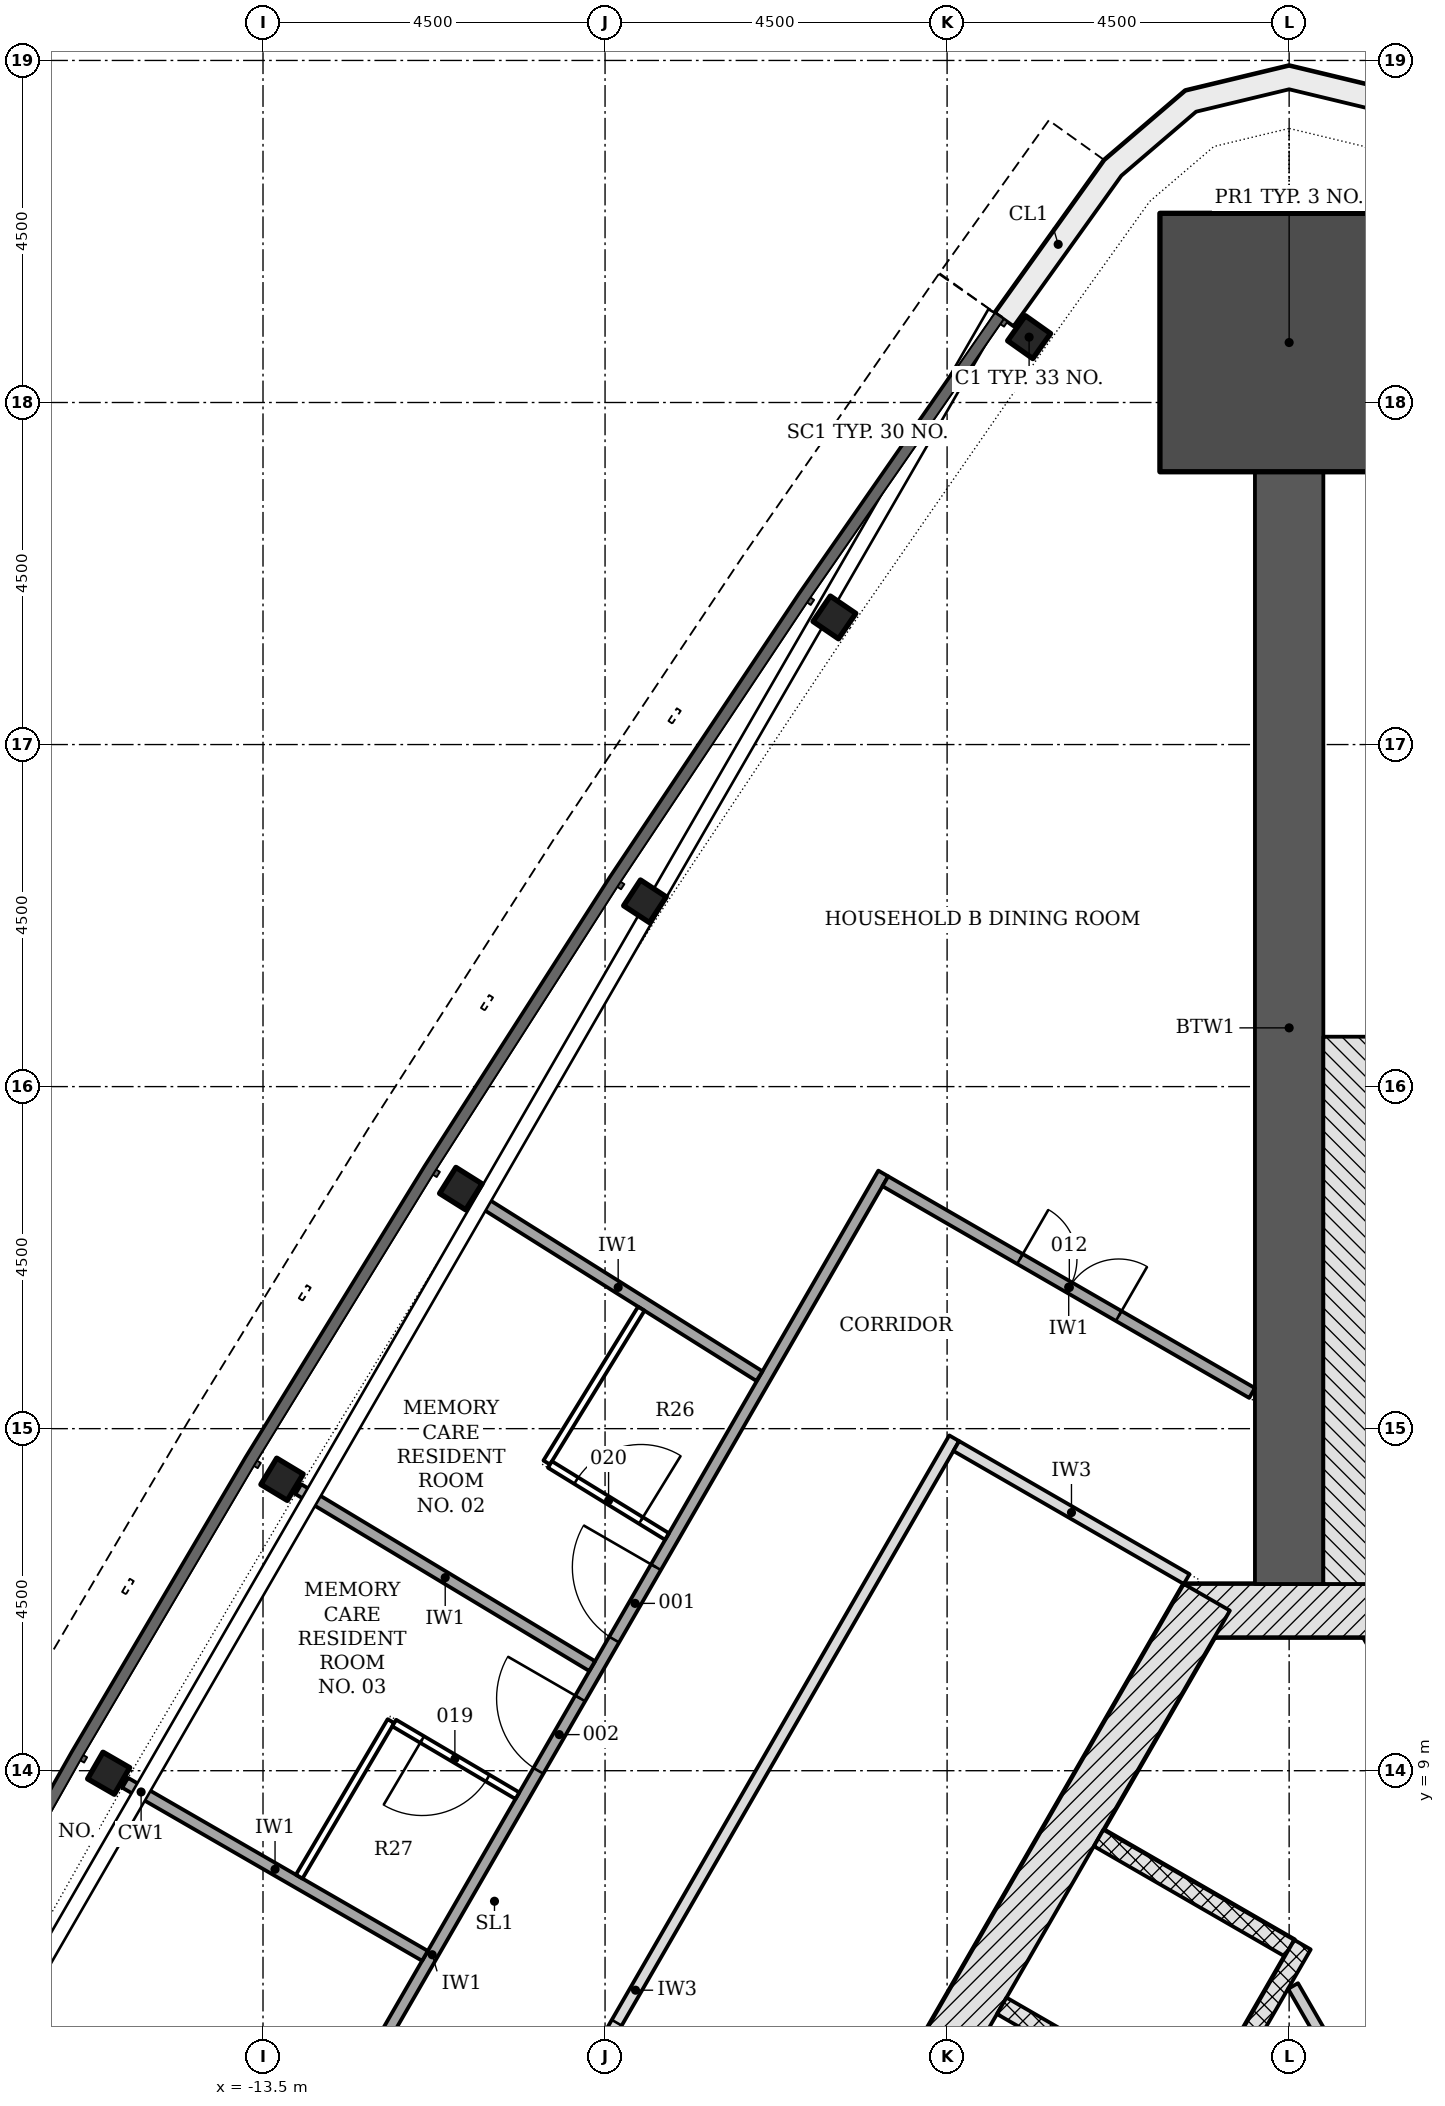
"""IFC4 building model, lengths in metres.
Left out: names, types, materials, properties, quantities, classifications, styles, units other than length and angle.
Written with IfcOpenShell. Run it as: python <this file> out.ifc"""

import sys

from ifc_helpers import new_model, si_unit, direction, frame, frame_2d, origin, origin_2d, place, context, subcontext, project, spatial, polyline, rectangle, i_section, outline, extrude, element, fill, save


model = new_model("IFC4")
c1 = context("Model", 3, precision=1e-05, world=origin(), true_north=direction((0.0, 1.0)))
c2 = subcontext(c1, "Body", "Model", "MODEL_VIEW")
j1 = project(units=[si_unit("LENGTHUNIT", "METRE"), si_unit("PLANEANGLEUNIT", "RADIAN")], contexts=[c1])
p1 = place(None, origin())
s1 = spatial("IfcSite", under=j1, at=p1, CompositionType="ELEMENT")
p2 = place(p1, origin())
s2 = spatial("IfcBuilding", under=s1, at=p2, CompositionType="ELEMENT")
p3 = place(p2, frame((0.0, 0.0, 27.6)))
s3 = spatial("IfcBuildingStorey", under=s2, at=p3, CompositionType="ELEMENT", Elevation=27.6)
p4 = place(p3, frame((10.311, -4.703, -0.2), z_axis=(0.0, 0.0, 1.0), x_axis=(-0.500001446645, 0.866024568562, 0.0)))
e1 = element("IfcWall", 1, at=p4, inside=s3, PredefinedType="SHEAR", context=c2, shape_type="SweptSolid", body=[
    extrude(rectangle(XDim=18.458, YDim=0.7, at=frame_2d((9.229, 0.0))), origin(), (0.0, 0.0, 1.0), 3.6),
])
p5 = place(p4, frame((8.7, 0.0, 0.2)))
e2 = element("IfcOpeningElement", 2, at=p5, cuts=e1, PredefinedType="OPENING", context=c2, shape_type="SweptSolid", body=[
    extrude(rectangle(XDim=1.0, YDim=2.1, at=frame_2d((0.5, 1.05))), frame((0.0, 0.36, 0.0), z_axis=(0.0, -1.0, 0.0), x_axis=(1.0, 0.0, 0.0)), (0.0, 0.0, 1.0), 0.72),
])
p6 = place(p4, frame((3.99, 0.0, 0.2)))
e3 = element("IfcOpeningElement", 3, at=p6, cuts=e1, PredefinedType="OPENING", context=c2, shape_type="SweptSolid", body=[
    extrude(rectangle(XDim=0.9, YDim=2.1, at=frame_2d((0.45, 1.05))), frame((0.0, 0.36, 0.0), z_axis=(0.0, -1.0, 0.0), x_axis=(1.0, 0.0, 0.0)), (0.0, 0.0, 1.0), 0.72),
])
p7 = place(p4, frame((13.539, 0.0, 0.2)))
e4 = element("IfcOpeningElement", 4, at=p7, cuts=e1, PredefinedType="OPENING", context=c2, shape_type="SweptSolid", body=[
    extrude(rectangle(XDim=0.9, YDim=2.1, at=frame_2d((0.45, 1.05))), frame((0.0, 0.36, 0.0), z_axis=(0.0, -1.0, 0.0), x_axis=(1.0, 0.0, 0.0)), (0.0, 0.0, 1.0), 0.72),
])
p8 = place(p3, frame((1.386, 11.106, -0.2), z_axis=(0.0, 0.0, 1.0), x_axis=(-1.0, 0.0, 0.0)))
e5 = element("IfcWall", 5, at=p8, inside=s3, PredefinedType="SHEAR", context=c2, shape_type="SweptSolid", body=[
    extrude(rectangle(XDim=2.771, YDim=0.7, at=frame_2d((1.386, 0.0))), origin(), (0.0, 0.0, 1.0), 3.6),
])
p9 = place(p3, frame((-1.083, 11.281, -0.2), z_axis=(0.0, 0.0, 1.0), x_axis=(-0.500001446645, -0.866024568562, 0.0)))
e6 = element("IfcWall", 6, at=p9, inside=s3, PredefinedType="SHEAR", context=c2, shape_type="SweptSolid", body=[
    extrude(rectangle(XDim=18.458, YDim=0.7, at=frame_2d((9.229, 0.0))), origin(), (0.0, 0.0, 1.0), 3.6),
])
p10 = place(p9, frame((8.979, 0.0, 0.2)))
e7 = element("IfcOpeningElement", 7, at=p10, cuts=e6, PredefinedType="OPENING", context=c2, shape_type="SweptSolid", body=[
    extrude(rectangle(XDim=1.2, YDim=2.1, at=frame_2d((0.6, 1.05))), frame((0.0, 0.36, 0.0), z_axis=(0.0, -1.0, 0.0), x_axis=(1.0, 0.0, 0.0)), (0.0, 0.0, 1.0), 0.72),
])
p11 = place(p9, frame((11.029, 0.0, 0.2)))
e8 = element("IfcOpeningElement", 8, at=p11, cuts=e6, PredefinedType="OPENING", context=c2, shape_type="SweptSolid", body=[
    extrude(rectangle(XDim=1.2, YDim=2.1, at=frame_2d((0.6, 1.05))), frame((0.0, 0.36, 0.0), z_axis=(0.0, -1.0, 0.0), x_axis=(1.0, 0.0, 0.0)), (0.0, 0.0, 1.0), 0.72),
])
p12 = place(p3, frame((0.0, 11.456, -0.2), z_axis=(0.0, 0.0, 1.0), x_axis=(0.0, 1.0, 0.0)))
e9 = element("IfcWall", 9, at=p12, inside=s3, PredefinedType="SHEAR", context=c2, shape_type="SweptSolid", body=[
    extrude(rectangle(XDim=14.633, YDim=0.9, at=frame_2d((7.316, 0.0))), origin(), (0.0, 0.0, 1.0), 3.6),
])
p13 = place(p3, frame((0.0, 27.789, -0.2), z_axis=(0.0, 0.0, 1.0), x_axis=(0.0, 1.0, 0.0)))
e10 = element("IfcColumn", 10, at=p13, inside=s3, PredefinedType="COLUMN", context=c2, shape_type="SweptSolid", body=[
    extrude(rectangle(XDim=3.4, YDim=3.4, at=origin_2d()), origin(), (0.0, 0.0, 1.0), 3.6),
])
for number, where, z_axis, x_axis in (
    (11, (-3.421, 27.86, -0.2), (0.0, 0.0, 1.0), (-0.578, -0.816, 0.0)),
    (12, (-5.982, 24.172, -0.2), (0.0, 0.0, 1.0), (-0.563, -0.827, 0.0)),
    (13, (-8.475, 20.438, -0.2), (0.0, 0.0, 1.0), (-0.547, -0.837, 0.0)),
    (14, (-10.897, 16.658, -0.2), (0.0, 0.0, 1.0), (-0.532, -0.847, 0.0)),
    (15, (-13.25, 12.834, -0.2), (0.0, 0.0, 1.0), (-0.516, -0.857, 0.0)),
    (16, (-15.531, 8.967, -0.2), (0.0, 0.0, 1.0), (-0.5, -0.866, 0.0)),
):
    element("IfcColumn", number, at=place(p3, frame(where, z_axis=z_axis, x_axis=x_axis)), inside=s3, PredefinedType="COLUMN", context=c2, shape_type="SweptSolid", body=[
        extrude(i_section(OverallWidth=0.404, OverallDepth=0.406, WebThickness=0.027, FlangeThickness=0.044, FilletRadius=0.015, at=origin_2d()), origin(), (0.0, 0.0, 1.0), 3.6),
    ])
p14 = place(p3, origin())
e17 = element("IfcWall", 17, at=p14, inside=s3, PredefinedType="NOTDEFINED", context=c2, shape_type="SweptSolid", body=[
    extrude(outline(polyline([(3.87, 28.178), (2.43, 30.188), (1.364, 31.101), (0.0, 31.429), (-1.364, 31.101), (-2.43, 30.188), (-3.87, 28.178), (-3.626, 28.003), (-2.208, 29.984), (-1.224, 30.826), (0.0, 31.121), (1.224, 30.826), (2.208, 29.984), (3.626, 28.003), (3.87, 28.178)])), origin(), (0.0, 0.0, 1.0), 3.3),
])
p15 = place(p3, frame((-2.506, 8.115, -0.2), z_axis=(0.0, 0.0, 1.0), x_axis=(0.865996321171, -0.50005036918, 0.0)))
e18 = element("IfcWall", 18, at=p15, inside=s3, PredefinedType="PARTITIONING", context=c2, shape_type="SweptSolid", body=[
    extrude(rectangle(XDim=2.9, YDim=0.25, at=frame_2d((1.45, 0.0))), origin(), (0.0, 0.0, 1.0), 3.6),
])
p16 = place(p3, frame((-3.781, 5.907, -0.2), z_axis=(0.0, 0.0, 1.0), x_axis=(0.866032775405, -0.499987231761, 0.0)))
e19 = element("IfcWall", 19, at=p16, inside=s3, PredefinedType="PARTITIONING", context=c2, shape_type="SweptSolid", body=[
    extrude(rectangle(XDim=2.9, YDim=0.25, at=frame_2d((1.45, 0.0))), origin(), (0.0, 0.0, 1.0), 3.6),
])
p17 = place(p3, frame((0.176, 6.711, 0.0), z_axis=(0.0, 0.0, 1.0), x_axis=(-0.500004227369, -0.866022963098, 0.0)))
e20 = element("IfcWall", 20, at=p17, inside=s3, PredefinedType="PARTITIONING", context=c2, shape_type="SweptSolid", body=[
    extrude(rectangle(XDim=11.8, YDim=0.25, at=frame_2d((5.9, 0.0))), origin(), (0.0, 0.0, 1.0), 3.4),
])
p18 = place(p3, frame((2.174, 2.492, 0.0), z_axis=(0.0, 0.0, 1.0), x_axis=(-0.499999641798, 0.866025610592, 0.0)))
e21 = element("IfcWall", 21, at=p18, inside=s3, PredefinedType="PARTITIONING", context=c2, shape_type="SweptSolid", body=[
    extrude(rectangle(XDim=4.244, YDim=0.15, at=frame_2d((2.122, 0.0))), origin(), (0.0, 0.0, 1.0), 3.4),
])
p19 = place(p3, frame((1.018, 11.456, -0.2), z_axis=(0.0, 0.0, 1.0), x_axis=(0.0, 1.0, 0.0)))
e22 = element("IfcWall", 22, at=p19, inside=s3, PredefinedType="SHEAR", context=c2, shape_type="SweptSolid", body=[
    extrude(rectangle(XDim=7.2, YDim=1.136, at=frame_2d((3.6, 0.0))), origin(), (0.0, 0.0, 1.0), 3.6),
])
p20 = place(p3, frame((-17.208, -3.699, 0.0), z_axis=(0.0, 0.0, 1.0), x_axis=(0.499997567621, 0.866026808115, 0.0)))
e23 = element("IfcWall", 23, at=p20, inside=s3, PredefinedType="PARTITIONING", context=c2, shape_type="SweptSolid", body=[
    extrude(rectangle(XDim=23.736, YDim=0.15, at=frame_2d((11.868, 0.0))), origin(), (0.0, 0.0, 1.0), 2.768),
])
p21 = place(p20, frame((16.656, 0.0, 0.0)))
e24 = element("IfcOpeningElement", 24, at=p21, cuts=e23, PredefinedType="OPENING", context=c2, shape_type="SweptSolid", body=[
    extrude(rectangle(XDim=1.1, YDim=2.1, at=frame_2d((0.55, 1.05))), frame((0.0, 0.085, 0.0), z_axis=(0.0, -1.0, 0.0), x_axis=(1.0, 0.0, 0.0)), (0.0, 0.0, 1.0), 0.17),
])
p22 = place(p20, frame((14.662, 0.0, 0.0)))
e25 = element("IfcOpeningElement", 25, at=p22, cuts=e23, PredefinedType="OPENING", context=c2, shape_type="SweptSolid", body=[
    extrude(rectangle(XDim=1.1, YDim=2.1, at=frame_2d((0.55, 1.05))), frame((0.0, 0.085, 0.0), z_axis=(0.0, -1.0, 0.0), x_axis=(1.0, 0.0, 0.0)), (0.0, 0.0, 1.0), 0.17),
])
p23 = place(p20, frame((5.273, 0.0, 0.0)))
e26 = element("IfcOpeningElement", 26, at=p23, cuts=e23, PredefinedType="OPENING", context=c2, shape_type="SweptSolid", body=[
    extrude(rectangle(XDim=1.0, YDim=2.1, at=frame_2d((0.5, 1.05))), frame((0.0, 0.085, 0.0), z_axis=(0.0, -1.0, 0.0), x_axis=(1.0, 0.0, 0.0)), (0.0, 0.0, 1.0), 0.17),
])
p24 = place(p3, frame((-4.407, 13.374, 0.0), z_axis=(0.0, 0.0, 1.0), x_axis=(-0.499997181693, -0.866027030928, 0.0)))
e27 = element("IfcWall", 27, at=p24, inside=s3, PredefinedType="PARTITIONING", context=c2, shape_type="SweptSolid", body=[
    extrude(rectangle(XDim=16.77, YDim=0.15, at=frame_2d((8.385, 0.0))), origin(), (0.0, 0.0, 1.0), 2.768),
])
p25 = place(p24, frame((8.879, 0.0, 0.0)))
e28 = element("IfcOpeningElement", 28, at=p25, cuts=e27, PredefinedType="OPENING", context=c2, shape_type="SweptSolid", body=[
    extrude(rectangle(XDim=1.0, YDim=2.1, at=frame_2d((0.5, 1.05))), frame((0.0, 0.085, 0.0), z_axis=(0.0, -1.0, 0.0), x_axis=(1.0, 0.0, 0.0)), (0.0, 0.0, 1.0), 0.17),
])
p26 = place(p3, frame((-5.312, 16.755, 0.0), z_axis=(0.0, 0.0, 1.0), x_axis=(0.866028693448, -0.499994302092, 0.0)))
e29 = element("IfcWall", 29, at=p26, inside=s3, PredefinedType="PARTITIONING", context=c2, shape_type="SweptSolid", body=[
    extrude(rectangle(XDim=5.571, YDim=0.15, at=frame_2d((2.786, 0.0))), origin(), (0.0, 0.0, 1.0), 3.4),
])
p27 = place(p26, frame((2.045, 0.0, 0.0)))
e30 = element("IfcOpeningElement", 30, at=p27, cuts=e29, PredefinedType="OPENING", context=c2, shape_type="SweptSolid", body=[
    extrude(rectangle(XDim=1.5, YDim=2.1, at=frame_2d((0.75, 1.05))), frame((0.0, 0.085, 0.0), z_axis=(0.0, -1.0, 0.0), x_axis=(1.0, 0.0, 0.0)), (0.0, 0.0, 1.0), 0.17),
])
p28 = place(p3, frame((-4.379, 13.271, 0.0), z_axis=(0.0, 0.0, 1.0), x_axis=(0.866019471182, -0.500010275428, 0.0)))
e31 = element("IfcWall", 31, at=p28, inside=s3, PredefinedType="PARTITIONING", context=c2, shape_type="SweptSolid", body=[
    extrude(rectangle(XDim=3.5, YDim=0.15, at=frame_2d((1.75, 0.0))), origin(), (0.0, 0.0, 1.0), 3.4),
])
p29 = place(p3, frame((-15.314, 8.842, 0.0), z_axis=(0.0, 0.0, 1.0), x_axis=(0.866031166731, -0.499990018151, 0.0)))
e32 = element("IfcWall", 32, at=p29, inside=s3, PredefinedType="PARTITIONING", context=c2, shape_type="SweptSolid", body=[
    extrude(rectangle(XDim=4.555, YDim=0.15, at=frame_2d((2.277, 0.0))), origin(), (0.0, 0.0, 1.0), 2.768),
])
p30 = place(p3, frame((-13.036, 12.705, 0.0), z_axis=(0.0, 0.0, 1.0), x_axis=(0.856594224171, -0.515990634719, 0.0)))
e33 = element("IfcWall", 33, at=p30, inside=s3, PredefinedType="PARTITIONING", context=c2, shape_type="SweptSolid", body=[
    extrude(rectangle(XDim=4.513, YDim=0.15, at=frame_2d((2.256, 0.0))), origin(), (0.0, 0.0, 1.0), 2.768),
])
p31 = place(p3, frame((-10.686, 16.525, 0.0), z_axis=(0.0, 0.0, 1.0), x_axis=(0.846871345174, -0.531797823165, 0.0)))
e34 = element("IfcWall", 34, at=p31, inside=s3, PredefinedType="PARTITIONING", context=c2, shape_type="SweptSolid", body=[
    extrude(rectangle(XDim=4.389, YDim=0.15, at=frame_2d((2.194, 0.0))), origin(), (0.0, 0.0, 1.0), 2.768),
])
for number, where, z_axis, x_axis in (
    (35, (-8.523, 15.078, 0.0), (0.0, 0.0, 1.0), (-0.524, -0.852, 0.0)),
    (36, (-13.024, 7.606, 0.0), (0.0, 0.0, 1.0), (0.508, 0.861, 0.0)),
):
    element("IfcWall", number, at=place(p3, frame(where, z_axis=z_axis, x_axis=x_axis)), inside=s3, PredefinedType="PARTITIONING", context=c2, shape_type="SweptSolid", body=[
        extrude(rectangle(XDim=2.375, YDim=0.1, at=frame_2d((1.188, 0.0))), origin(), (0.0, 0.0, 1.0), 2.768),
    ])
p32 = place(p3, frame((-10.153, 8.671, 0.0), z_axis=(0.0, 0.0, 1.0), x_axis=(-0.861326599867, 0.508051659147, 0.0)))
e37 = element("IfcWall", 37, at=p32, inside=s3, PredefinedType="PARTITIONING", context=c2, shape_type="SweptSolid", body=[
    extrude(rectangle(XDim=1.882, YDim=0.1, at=frame_2d((0.941, 0.0))), origin(), (0.0, 0.0, 1.0), 3.4),
])
p33 = place(p32, frame((0.455, 0.0, 0.0)))
e38 = element("IfcOpeningElement", 38, at=p33, cuts=e37, PredefinedType="OPENING", context=c2, shape_type="SweptSolid", body=[
    extrude(rectangle(XDim=1.0, YDim=2.1, at=frame_2d((0.5, 1.05))), frame((0.0, 0.06, 0.0), z_axis=(0.0, -1.0, 0.0), x_axis=(1.0, 0.0, 0.0)), (0.0, 0.0, 1.0), 0.12),
])
p34 = place(p3, frame((-9.725, 13.029, 0.0), z_axis=(0.0, 0.0, 1.0), x_axis=(0.851755692017, -0.523939157839, 0.0)))
e39 = element("IfcWall", 39, at=p34, inside=s3, PredefinedType="PARTITIONING", context=c2, shape_type="SweptSolid", body=[
    extrude(rectangle(XDim=1.808, YDim=0.1, at=frame_2d((0.904, 0.0))), origin(), (0.0, 0.0, 1.0), 3.4),
])
p35 = place(p34, frame((0.406, 0.0, 0.0)))
e40 = element("IfcOpeningElement", 40, at=p35, cuts=e39, PredefinedType="OPENING", context=c2, shape_type="SweptSolid", body=[
    extrude(rectangle(XDim=1.0, YDim=2.1, at=frame_2d((0.5, 1.05))), frame((0.0, 0.06, 0.0), z_axis=(0.0, -1.0, 0.0), x_axis=(1.0, 0.0, 0.0)), (0.0, 0.0, 1.0), 0.12),
])
p36 = place(p21, origin())
e41 = element("IfcDoor", 41, at=p36, inside=s3, OperationType="SINGLE_SWING_RIGHT", PredefinedType="DOOR", context=c2, shape_type="SweptSolid", body=[
    extrude(rectangle(XDim=1.1, YDim=2.1, at=frame_2d((0.55, 1.05))), frame((0.0, 0.025, 0.0), z_axis=(0.0, -1.0, 0.0), x_axis=(1.0, 0.0, 0.0)), (0.0, 0.0, 1.0), 0.05),
])
fill(e24, e41)
p37 = place(p22, origin())
e42 = element("IfcDoor", 42, at=p37, inside=s3, OperationType="SINGLE_SWING_RIGHT", PredefinedType="DOOR", context=c2, shape_type="SweptSolid", body=[
    extrude(rectangle(XDim=1.1, YDim=2.1, at=frame_2d((0.55, 1.05))), frame((0.0, 0.025, 0.0), z_axis=(0.0, -1.0, 0.0), x_axis=(1.0, 0.0, 0.0)), (0.0, 0.0, 1.0), 0.05),
])
fill(e25, e42)
p38 = place(p25, origin())
e43 = element("IfcDoor", 43, at=p38, inside=s3, OperationType="SINGLE_SWING_RIGHT", PredefinedType="DOOR", context=c2, shape_type="SweptSolid", body=[
    extrude(rectangle(XDim=1.0, YDim=2.1, at=frame_2d((0.5, 1.05))), frame((0.0, 0.025, 0.0), z_axis=(0.0, -1.0, 0.0), x_axis=(1.0, 0.0, 0.0)), (0.0, 0.0, 1.0), 0.05),
])
fill(e28, e43)
p39 = place(p27, origin())
e44 = element("IfcDoor", 44, at=p39, inside=s3, OperationType="DOUBLE_DOOR_SINGLE_SWING", PredefinedType="DOOR", context=c2, shape_type="SweptSolid", body=[
    extrude(rectangle(XDim=1.5, YDim=2.1, at=frame_2d((0.75, 1.05))), frame((0.0, 0.025, 0.0), z_axis=(0.0, -1.0, 0.0), x_axis=(1.0, 0.0, 0.0)), (0.0, 0.0, 1.0), 0.05),
])
fill(e30, e44)
p40 = place(p33, origin())
e45 = element("IfcDoor", 45, at=p40, inside=s3, OperationType="SINGLE_SWING_RIGHT", PredefinedType="DOOR", context=c2, shape_type="SweptSolid", body=[
    extrude(rectangle(XDim=1.0, YDim=2.1, at=frame_2d((0.5, 1.05))), frame((0.0, 0.025, 0.0), z_axis=(0.0, -1.0, 0.0), x_axis=(1.0, 0.0, 0.0)), (0.0, 0.0, 1.0), 0.05),
])
fill(e38, e45)
p41 = place(p35, origin())
e46 = element("IfcDoor", 46, at=p41, inside=s3, OperationType="SINGLE_SWING_RIGHT", PredefinedType="DOOR", context=c2, shape_type="SweptSolid", body=[
    extrude(rectangle(XDim=1.0, YDim=2.1, at=frame_2d((0.5, 1.05))), frame((0.0, 0.025, 0.0), z_axis=(0.0, -1.0, 0.0), x_axis=(1.0, 0.0, 0.0)), (0.0, 0.0, 1.0), 0.05),
])
fill(e40, e46)
save(model, sys.argv[1])
